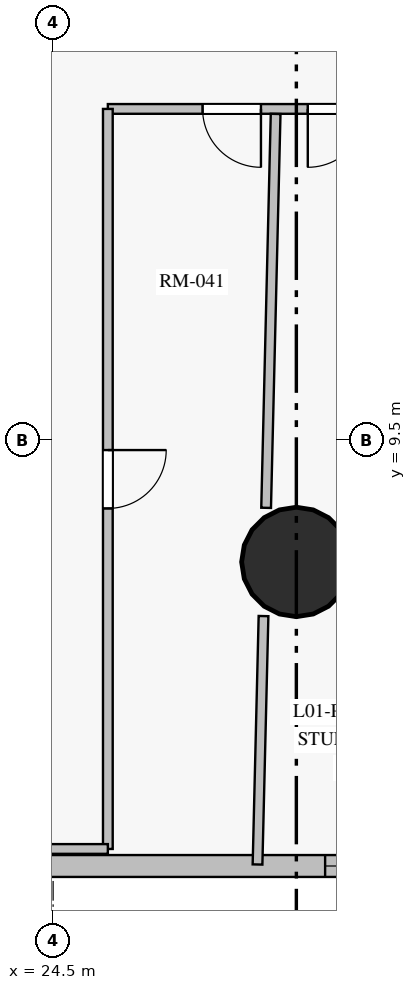
"""IFC4 building model, lengths in metres.
Left out: names, types, materials, properties, quantities, classifications, styles, units other than length and angle.
Written with IfcOpenShell. Run it as: python <this file> out.ifc"""

import sys

from ifc_helpers import new_model, si_unit, direction, frame, frame_2d, origin, origin_with_axes, origin_2d, place, context, subcontext, project, spatial, rectangle, circle, extrude, source, transform, mapped, element, fill, save


model = new_model("IFC4")
c1 = context("Model", 3, precision=1e-05, world=origin(), true_north=direction((0.0, 1.0)))
c2 = subcontext(c1, "Body", "Model", "MODEL_VIEW")
j1 = project(units=[si_unit("LENGTHUNIT", "METRE"), si_unit("PLANEANGLEUNIT", "RADIAN")], contexts=[c1])
p1 = place(None, origin())
s1 = spatial("IfcSite", under=j1, at=p1, CompositionType="ELEMENT")
p2 = place(p1, origin())
s2 = spatial("IfcBuilding", under=s1, at=p2, CompositionType="ELEMENT")
p3 = place(p2, frame((0.0, 0.0, 4.5)))
s3 = spatial("IfcBuildingStorey", under=s2, at=p3, CompositionType="ELEMENT", Elevation=4.5)
m1 = source(origin_with_axes(), c2, "Body", "SweptSolid", [
    extrude(circle(Radius=0.9, at=origin_2d()), origin(), (0.0, 0.0, 1.0), 4.5),
])
p4 = place(p3, frame((28.5, 7.5, 0.0), z_axis=(0.0, 0.0, 1.0), x_axis=(1.0, 0.0, 0.0)))
e1 = element("IfcColumn", 1, at=p4, inside=s3, PredefinedType="COLUMN", context=c2, shape_type="MappedRepresentation", body=[
    mapped(m1, transform((0.0, 0.0, 0.0), scale=1.0)),
])
p5 = place(p3, frame((3.45, 2.5, 0.0), z_axis=(0.0, 0.0, 1.0), x_axis=(1.0, 0.0, 0.0)))
e2 = element("IfcWall", 2, at=p5, inside=s3, PredefinedType="SOLIDWALL", context=c2, shape_type="SweptSolid", body=[
    extrude(rectangle(XDim=51.85, YDim=0.36, at=frame_2d((25.925, 0.0))), origin(), (0.0, 0.0, 1.0), 4.2),
])
p6 = place(p5, frame((1.516, 0.0, 0.85)))
e3 = element("IfcOpeningElement", 3, at=p6, cuts=e2, PredefinedType="OPENING", context=c2, shape_type="SweptSolid", body=[
    extrude(rectangle(XDim=1.8, YDim=2.2, at=frame_2d((0.9, 1.1))), frame((0.0, 0.19, 0.0), z_axis=(0.0, -1.0, 0.0), x_axis=(1.0, 0.0, 0.0)), (0.0, 0.0, 1.0), 0.38),
])
p7 = place(p5, frame((6.037, 0.0, 0.85)))
e4 = element("IfcOpeningElement", 4, at=p7, cuts=e2, PredefinedType="OPENING", context=c2, shape_type="SweptSolid", body=[
    extrude(rectangle(XDim=1.8, YDim=2.2, at=frame_2d((0.9, 1.1))), frame((0.0, 0.19, 0.0), z_axis=(0.0, -1.0, 0.0), x_axis=(1.0, 0.0, 0.0)), (0.0, 0.0, 1.0), 0.38),
])
p8 = place(p5, frame((12.611, 0.0, 0.85)))
e5 = element("IfcOpeningElement", 5, at=p8, cuts=e2, PredefinedType="OPENING", context=c2, shape_type="SweptSolid", body=[
    extrude(rectangle(XDim=1.8, YDim=2.2, at=frame_2d((0.9, 1.1))), frame((0.0, 0.19, 0.0), z_axis=(0.0, -1.0, 0.0), x_axis=(1.0, 0.0, 0.0)), (0.0, 0.0, 1.0), 0.38),
])
p9 = place(p5, frame((18.95, 0.0, 0.85)))
e6 = element("IfcOpeningElement", 6, at=p9, cuts=e2, PredefinedType="OPENING", context=c2, shape_type="SweptSolid", body=[
    extrude(rectangle(XDim=1.8, YDim=2.2, at=frame_2d((0.9, 1.1))), frame((0.0, 0.19, 0.0), z_axis=(0.0, -1.0, 0.0), x_axis=(1.0, 0.0, 0.0)), (0.0, 0.0, 1.0), 0.38),
])
p10 = place(p5, frame((25.523, 0.0, 0.85)))
e7 = element("IfcOpeningElement", 7, at=p10, cuts=e2, PredefinedType="OPENING", context=c2, shape_type="SweptSolid", body=[
    extrude(rectangle(XDim=1.8, YDim=2.2, at=frame_2d((0.9, 1.1))), frame((0.0, 0.19, 0.0), z_axis=(0.0, -1.0, 0.0), x_axis=(1.0, 0.0, 0.0)), (0.0, 0.0, 1.0), 0.38),
])
p11 = place(p5, frame((30.945, 0.0, 0.85)))
e8 = element("IfcOpeningElement", 8, at=p11, cuts=e2, PredefinedType="OPENING", context=c2, shape_type="SweptSolid", body=[
    extrude(rectangle(XDim=1.8, YDim=2.2, at=frame_2d((0.9, 1.1))), frame((0.0, 0.19, 0.0), z_axis=(0.0, -1.0, 0.0), x_axis=(1.0, 0.0, 0.0)), (0.0, 0.0, 1.0), 0.38),
])
p12 = place(p5, frame((34.214, 0.0, 0.85)))
e9 = element("IfcOpeningElement", 9, at=p12, cuts=e2, PredefinedType="OPENING", context=c2, shape_type="SweptSolid", body=[
    extrude(rectangle(XDim=1.8, YDim=2.2, at=frame_2d((0.9, 1.1))), frame((0.0, 0.19, 0.0), z_axis=(0.0, -1.0, 0.0), x_axis=(1.0, 0.0, 0.0)), (0.0, 0.0, 1.0), 0.38),
])
p13 = place(p5, frame((37.394, 0.0, 0.85)))
e10 = element("IfcOpeningElement", 10, at=p13, cuts=e2, PredefinedType="OPENING", context=c2, shape_type="SweptSolid", body=[
    extrude(rectangle(XDim=1.8, YDim=2.2, at=frame_2d((0.9, 1.1))), frame((0.0, 0.19, 0.0), z_axis=(0.0, -1.0, 0.0), x_axis=(1.0, 0.0, 0.0)), (0.0, 0.0, 1.0), 0.38),
])
p14 = place(p5, frame((44.871, 0.0, 0.85)))
e11 = element("IfcOpeningElement", 11, at=p14, cuts=e2, PredefinedType="OPENING", context=c2, shape_type="SweptSolid", body=[
    extrude(rectangle(XDim=1.8, YDim=2.2, at=frame_2d((0.9, 1.1))), frame((0.0, 0.19, 0.0), z_axis=(0.0, -1.0, 0.0), x_axis=(1.0, 0.0, 0.0)), (0.0, 0.0, 1.0), 0.38),
])
p15 = place(p3, frame((39.988, 14.95, 0.0), z_axis=(0.0, 0.0, 1.0), x_axis=(-1.0, 0.0, 0.0)))
e12 = element("IfcWall", 12, at=p15, inside=s3, PredefinedType="PARTITIONING", context=c2, shape_type="SweptSolid", body=[
    extrude(rectangle(XDim=14.588, YDim=0.16, at=frame_2d((7.294, 0.0))), origin(), (0.0, 0.0, 1.0), 4.2),
])
p16 = place(p15, frame((10.34, 0.0, 0.0)))
e13 = element("IfcOpeningElement", 13, at=p16, cuts=e12, PredefinedType="OPENING", context=c2, shape_type="SweptSolid", body=[
    extrude(rectangle(XDim=0.96, YDim=2.15, at=frame_2d((0.48, 1.075))), frame((0.0, 0.09, 0.0), z_axis=(0.0, -1.0, 0.0), x_axis=(1.0, 0.0, 0.0)), (0.0, 0.0, 1.0), 0.18),
])
p17 = place(p15, frame((7.808, 0.0, 0.0)))
e14 = element("IfcOpeningElement", 14, at=p17, cuts=e12, PredefinedType="OPENING", context=c2, shape_type="SweptSolid", body=[
    extrude(rectangle(XDim=0.96, YDim=2.15, at=frame_2d((0.48, 1.075))), frame((0.0, 0.09, 0.0), z_axis=(0.0, -1.0, 0.0), x_axis=(1.0, 0.0, 0.0)), (0.0, 0.0, 1.0), 0.18),
])
p18 = place(p15, frame((6.145, 0.0, 0.0)))
e15 = element("IfcOpeningElement", 15, at=p18, cuts=e12, PredefinedType="OPENING", context=c2, shape_type="SweptSolid", body=[
    extrude(rectangle(XDim=0.96, YDim=2.15, at=frame_2d((0.48, 1.075))), frame((0.0, 0.09, 0.0), z_axis=(0.0, -1.0, 0.0), x_axis=(1.0, 0.0, 0.0)), (0.0, 0.0, 1.0), 0.18),
])
p19 = place(p15, frame((1.482, 0.0, 0.0)))
e16 = element("IfcOpeningElement", 16, at=p19, cuts=e12, PredefinedType="OPENING", context=c2, shape_type="SweptSolid", body=[
    extrude(rectangle(XDim=0.96, YDim=2.15, at=frame_2d((0.48, 1.075))), frame((0.0, 0.09, 0.0), z_axis=(0.0, -1.0, 0.0), x_axis=(1.0, 0.0, 0.0)), (0.0, 0.0, 1.0), 0.18),
])
p20 = place(p15, frame((12.07, 0.0, 0.0)))
e17 = element("IfcOpeningElement", 17, at=p20, cuts=e12, PredefinedType="OPENING", context=c2, shape_type="SweptSolid", body=[
    extrude(rectangle(XDim=0.96, YDim=2.15, at=frame_2d((0.48, 1.075))), frame((0.0, 0.09, 0.0), z_axis=(0.0, -1.0, 0.0), x_axis=(1.0, 0.0, 0.0)), (0.0, 0.0, 1.0), 0.18),
])
p21 = place(p3, frame((25.4, 14.95, 0.0), z_axis=(0.0, 0.0, 1.0), x_axis=(0.0, -1.0, 0.0)))
e18 = element("IfcWall", 18, at=p21, inside=s3, PredefinedType="PARTITIONING", context=c2, shape_type="SweptSolid", body=[
    extrude(rectangle(XDim=12.17, YDim=0.16, at=frame_2d((6.085, 0.0))), origin(), (0.0, 0.0, 1.0), 4.2),
])
p22 = place(p21, frame((5.61, 0.0, 0.0)))
e19 = element("IfcOpeningElement", 19, at=p22, cuts=e18, PredefinedType="OPENING", context=c2, shape_type="SweptSolid", body=[
    extrude(rectangle(XDim=0.96, YDim=2.15, at=frame_2d((0.48, 1.075))), frame((0.0, 0.09, 0.0), z_axis=(0.0, -1.0, 0.0), x_axis=(1.0, 0.0, 0.0)), (0.0, 0.0, 1.0), 0.18),
])
p23 = place(p3, frame((28.159, 14.868, 0.0), z_axis=(0.0, 0.0, 1.0), x_axis=(-0.024112983848, -0.999709239734, 0.0)))
e20 = element("IfcWall", 20, at=p23, inside=s3, PredefinedType="PARTITIONING", context=c2, shape_type="SweptSolid", body=[
    extrude(rectangle(XDim=6.48, YDim=0.16, at=frame_2d((3.24, 0.0))), origin(), (0.0, 0.0, 1.0), 3.25),
])
p24 = place(p3, frame((25.4, 2.78, 0.0), z_axis=(0.0, 0.0, 1.0), x_axis=(-1.0, 0.0, 0.0)))
e21 = element("IfcWall", 21, at=p24, inside=s3, PredefinedType="PARTITIONING", context=c2, shape_type="SweptSolid", body=[
    extrude(rectangle(XDim=4.2, YDim=0.16, at=frame_2d((2.1, 0.0))), origin(), (0.0, 0.0, 1.0), 4.2),
])
p25 = place(p3, frame((27.96, 6.61, 0.0), z_axis=(0.0, 0.0, 1.0), x_axis=(-0.024077163183, -0.999710103086, 0.0)))
e22 = element("IfcWall", 22, at=p25, inside=s3, PredefinedType="PARTITIONING", context=c2, shape_type="SweptSolid", body=[
    extrude(rectangle(XDim=4.086, YDim=0.16, at=frame_2d((2.043, 0.0))), origin(), (0.0, 0.0, 1.0), 4.2),
])
m2 = source(origin_with_axes(), c2, "Body", "SweptSolid", [
    extrude(rectangle(XDim=1.8, YDim=2.2, at=frame_2d((0.9, 1.1))), frame((0.0, 0.03, 0.0), z_axis=(0.0, -1.0, 0.0), x_axis=(1.0, 0.0, 0.0)), (0.0, 0.0, 1.0), 0.06),
])
p26 = place(p10, origin())
e23 = element("IfcWindow", 23, at=p26, inside=s3, PartitioningType="SINGLE_PANEL", PredefinedType="WINDOW", context=c2, shape_type="MappedRepresentation", body=[
    mapped(m2, transform((0.0, 0.0, 0.0), scale=1.0)),
])
fill(e7, e23)
m3 = source(origin_with_axes(), c2, "Body", "SweptSolid", [
    extrude(rectangle(XDim=0.96, YDim=2.15, at=frame_2d((0.48, 1.075))), frame((0.0, 0.025, 0.0), z_axis=(0.0, -1.0, 0.0), x_axis=(1.0, 0.0, 0.0)), (0.0, 0.0, 1.0), 0.05),
])
p27 = place(p22, origin())
e24 = element("IfcDoor", 24, at=p27, inside=s3, OperationType="SINGLE_SWING_LEFT", PredefinedType="DOOR", context=c2, shape_type="MappedRepresentation", body=[
    mapped(m3, transform((0.0, 0.0, 0.0), scale=1.0)),
])
fill(e19, e24)
p28 = place(p16, origin())
e25 = element("IfcDoor", 25, at=p28, inside=s3, OperationType="SINGLE_SWING_RIGHT", PredefinedType="DOOR", context=c2, shape_type="MappedRepresentation", body=[
    mapped(m3, transform((0.0, 0.0, 0.0), scale=1.0)),
])
fill(e13, e25)
p29 = place(p20, origin())
e26 = element("IfcDoor", 26, at=p29, inside=s3, OperationType="SINGLE_SWING_LEFT", PredefinedType="DOOR", context=c2, shape_type="MappedRepresentation", body=[
    mapped(m3, transform((0.0, 0.0, 0.0), scale=1.0)),
])
fill(e17, e26)
save(model, sys.argv[1])
